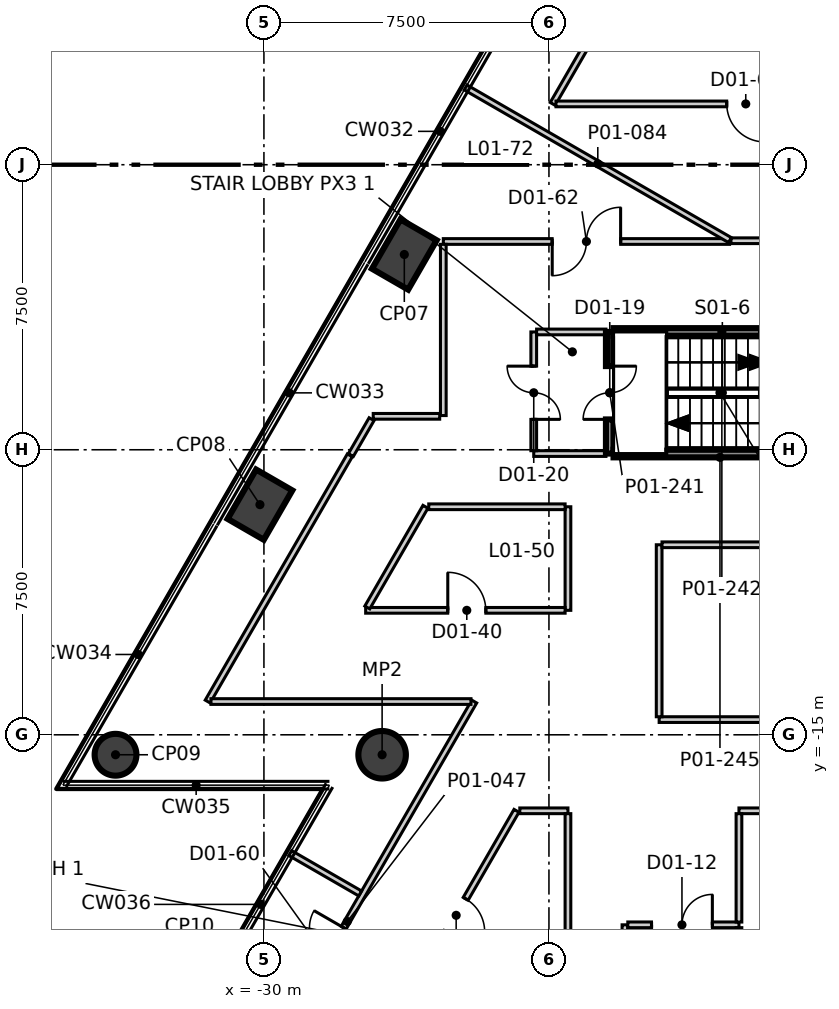
"""IFC4 building model, lengths in metres.
Left out: names, types, materials, properties, quantities, classifications, styles, units other than length and angle.
Written with IfcOpenShell. Run it as: python <this file> out.ifc"""

import sys

from ifc_helpers import new_model, si_unit, direction, frame, frame_2d, origin, origin_2d, place, context, subcontext, project, spatial, rectangle, circle, extrude, element, fill, save


model = new_model("IFC4")
c1 = context("Model", 3, precision=1e-05, world=origin(), true_north=direction((0.0, 1.0)))
c2 = subcontext(c1, "Body", "Model", "MODEL_VIEW")
j1 = project(units=[si_unit("LENGTHUNIT", "METRE"), si_unit("PLANEANGLEUNIT", "RADIAN")], contexts=[c1])
p1 = place(None, origin())
s1 = spatial("IfcSite", under=j1, at=p1, CompositionType="ELEMENT")
p2 = place(p1, origin())
s2 = spatial("IfcBuilding", under=s1, at=p2, CompositionType="ELEMENT")
p3 = place(p2, frame((0.0, 0.0, 8.5)))
s3 = spatial("IfcBuildingStorey", under=s2, at=p3, CompositionType="ELEMENT", Elevation=8.5)
for number, where, z_axis, x_axis in (
    (1, (-26.306, -2.362, -0.4), (0.0, 0.0, 1.0), (0.5, 0.866, 0.0)),
    (2, (-30.105, -8.944, -0.4), (0.0, 0.0, 1.0), (0.5, 0.866, 0.0)),
):
    element("IfcColumn", number, at=place(p3, frame(where, z_axis=z_axis, x_axis=x_axis)), inside=s3, PredefinedType="COLUMN", context=c2, shape_type="SweptSolid", body=[
        extrude(rectangle(XDim=1.5, YDim=1.1, at=origin_2d()), origin(), (0.0, 0.0, 1.0), 6.0),
    ])
p4 = place(p3, frame((-33.905, -15.525, -0.4), z_axis=(0.0, 0.0, 1.0), x_axis=(0.5, 0.866025403784, 0.0)))
e3 = element("IfcColumn", 3, at=p4, inside=s3, PredefinedType="COLUMN", context=c2, shape_type="SweptSolid", body=[
    extrude(circle(Radius=0.55, at=origin_2d()), origin(), (0.0, 0.0, 1.0), 6.0),
])
p5 = place(p3, frame((-26.89, -15.525, -0.4), z_axis=(0.0, 0.0, 1.0), x_axis=(1.0, 0.0, 0.0)))
e4 = element("IfcColumn", 4, at=p5, inside=s3, PredefinedType="COLUMN", context=c2, shape_type="SweptSolid", body=[
    extrude(circle(Radius=0.625, at=origin_2d()), origin(), (0.0, 0.0, 1.0), 6.0),
])
p6 = place(p3, frame((-22.9, -7.6, 0.0), z_axis=(0.0, 0.0, 1.0), x_axis=(1.0, 0.0, 0.0)))
e5 = element("IfcWall", 5, at=p6, inside=s3, PredefinedType="PARTITIONING", context=c2, shape_type="SweptSolid", body=[
    extrude(rectangle(XDim=1.9, YDim=0.15, at=frame_2d((0.95, 0.0))), origin(), (0.0, 0.0, 1.0), 5.6),
])
p7 = place(p3, frame((-22.9, -7.525, 0.0), z_axis=(0.0, 0.0, 1.0), x_axis=(0.0, 1.0, 0.0)))
e6 = element("IfcWall", 6, at=p7, inside=s3, PredefinedType="PARTITIONING", context=c2, shape_type="SweptSolid", body=[
    extrude(rectangle(XDim=3.125, YDim=0.15, at=frame_2d((1.562, 0.0))), origin(), (0.0, 0.0, 1.0), 5.6),
])
p8 = place(p7, frame((0.825, 0.0, 0.0)))
e7 = element("IfcOpeningElement", 7, at=p8, cuts=e6, PredefinedType="OPENING", context=c2, shape_type="SweptSolid", body=[
    extrude(rectangle(XDim=1.4, YDim=2.1, at=frame_2d((0.7, 1.05))), frame((0.0, 0.085, 0.0), z_axis=(0.0, -1.0, 0.0), x_axis=(1.0, 0.0, 0.0)), (0.0, 0.0, 1.0), 0.17),
])
p9 = place(p3, frame((-22.825, -4.4, 0.0), z_axis=(0.0, 0.0, 1.0), x_axis=(1.0, 0.0, 0.0)))
e8 = element("IfcWall", 8, at=p9, inside=s3, PredefinedType="PARTITIONING", context=c2, shape_type="SweptSolid", body=[
    extrude(rectangle(XDim=1.825, YDim=0.15, at=frame_2d((0.913, 0.0))), origin(), (0.0, 0.0, 1.0), 5.6),
])
p10 = place(p3, frame((-20.5, -25.0, 0.0), z_axis=(0.0, 0.0, 1.0), x_axis=(0.0, 1.0, 0.0)))
e9 = element("IfcWall", 9, at=p10, inside=s3, PredefinedType="PARTITIONING", context=c2, shape_type="SweptSolid", body=[
    extrude(rectangle(XDim=5.0, YDim=0.15, at=frame_2d((2.5, 0.0))), origin(), (0.0, 0.0, 1.0), 5.6),
])
p11 = place(p3, frame((-20.425, -20.0, 0.0), z_axis=(0.0, 0.0, 1.0), x_axis=(1.0, 0.0, 0.0)))
e10 = element("IfcWall", 10, at=p11, inside=s3, PredefinedType="PARTITIONING", context=c2, shape_type="SweptSolid", body=[
    extrude(rectangle(XDim=2.925, YDim=0.15, at=frame_2d((1.462, 0.0))), origin(), (0.0, 0.0, 1.0), 5.6),
])
p12 = place(p11, frame((0.625, 0.0, 0.0)))
e11 = element("IfcOpeningElement", 11, at=p12, cuts=e10, PredefinedType="OPENING", context=c2, shape_type="SweptSolid", body=[
    extrude(rectangle(XDim=1.6, YDim=2.1, at=frame_2d((0.8, 1.05))), frame((0.0, 0.085, 0.0), z_axis=(0.0, -1.0, 0.0), x_axis=(1.0, 0.0, 0.0)), (0.0, 0.0, 1.0), 0.17),
])
p13 = place(p3, frame((-17.5, -25.0, 0.0), z_axis=(0.0, 0.0, 1.0), x_axis=(0.0, 1.0, 0.0)))
e12 = element("IfcWall", 12, at=p13, inside=s3, PredefinedType="PARTITIONING", context=c2, shape_type="SweptSolid", body=[
    extrude(rectangle(XDim=4.925, YDim=0.15, at=frame_2d((2.462, 0.0))), origin(), (0.0, 0.0, 1.0), 5.6),
])
p14 = place(p3, frame((-31.148, -25.7, 0.0), z_axis=(0.0, 0.0, 1.0), x_axis=(0.499948573786, 0.866055092687, 0.0)))
e13 = element("IfcWall", 13, at=p14, inside=s3, PredefinedType="PARTITIONING", context=c2, shape_type="SweptSolid", body=[
    extrude(rectangle(XDim=13.365, YDim=0.15, at=frame_2d((6.683, 0.0))), origin(), (0.0, 0.0, 1.0), 5.6),
])
p15 = place(p14, frame((4.693, 0.0, 0.0)))
e14 = element("IfcOpeningElement", 14, at=p15, cuts=e13, PredefinedType="OPENING", context=c2, shape_type="SweptSolid", body=[
    extrude(rectangle(XDim=1.8, YDim=2.1, at=frame_2d((0.9, 1.05))), frame((0.0, 0.085, 0.0), z_axis=(0.0, -1.0, 0.0), x_axis=(1.0, 0.0, 0.0)), (0.0, 0.0, 1.0), 0.17),
])
p16 = place(p14, frame((0.895, 0.0, 0.0)))
e15 = element("IfcOpeningElement", 15, at=p16, cuts=e13, PredefinedType="OPENING", context=c2, shape_type="SweptSolid", body=[
    extrude(rectangle(XDim=1.8, YDim=2.1, at=frame_2d((0.9, 1.05))), frame((0.0, 0.085, 0.0), z_axis=(0.0, -1.0, 0.0), x_axis=(1.0, 0.0, 0.0)), (0.0, 0.0, 1.0), 0.17),
])
p17 = place(p3, frame((-29.308, -18.113, 0.0), z_axis=(0.0, 0.0, 1.0), x_axis=(0.866214269573, -0.499672732084, 0.0)))
e16 = element("IfcWall", 16, at=p17, inside=s3, PredefinedType="PARTITIONING", context=c2, shape_type="SweptSolid", body=[
    extrude(rectangle(XDim=2.125, YDim=0.15, at=frame_2d((1.063, 0.0))), origin(), (0.0, 0.0, 1.0), 5.6),
])
p18 = place(p3, frame((-25.28, -2.02, 0.0), z_axis=(0.0, 0.0, 1.0), x_axis=(1.0, 0.0, 0.0)))
e17 = element("IfcWall", 17, at=p18, inside=s3, PredefinedType="PARTITIONING", context=c2, shape_type="SweptSolid", body=[
    extrude(rectangle(XDim=7.533, YDim=0.15, at=frame_2d((3.767, 0.0))), origin(), (0.0, 0.0, 1.0), 5.0),
])
p19 = place(p18, frame((2.866, 0.0, 0.0)))
e18 = element("IfcOpeningElement", 18, at=p19, cuts=e17, PredefinedType="OPENING", context=c2, shape_type="SweptSolid", body=[
    extrude(rectangle(XDim=1.8, YDim=2.1, at=frame_2d((0.9, 1.05))), frame((0.0, 0.085, 0.0), z_axis=(0.0, -1.0, 0.0), x_axis=(1.0, 0.0, 0.0)), (0.0, 0.0, 1.0), 0.17),
])
p20 = place(p3, frame((-25.28, -6.6, 0.0), z_axis=(0.0, 0.0, 1.0), x_axis=(0.0, 1.0, 0.0)))
e19 = element("IfcWall", 19, at=p20, inside=s3, PredefinedType="PARTITIONING", context=c2, shape_type="SweptSolid", body=[
    extrude(rectangle(XDim=4.505, YDim=0.15, at=frame_2d((2.252, 0.0))), origin(), (0.0, 0.0, 1.0), 5.6),
])
p21 = place(p3, frame((-27.124, -6.62, 0.0), z_axis=(0.0, 0.0, 1.0), x_axis=(1.0, 0.0, 0.0)))
e20 = element("IfcWall", 20, at=p21, inside=s3, PredefinedType="PARTITIONING", context=c2, shape_type="SweptSolid", body=[
    extrude(rectangle(XDim=1.749, YDim=0.15, at=frame_2d((0.875, 0.0))), origin(), (0.0, 0.0, 1.0), 5.6),
])
p22 = place(p3, frame((-27.713, -7.64, 0.0), z_axis=(0.0, 0.0, 1.0), x_axis=(0.500277597875, 0.865865073245, 0.0)))
e21 = element("IfcWall", 21, at=p22, inside=s3, PredefinedType="PARTITIONING", context=c2, shape_type="SweptSolid", body=[
    extrude(rectangle(XDim=1.091, YDim=0.15, at=frame_2d((0.546, 0.0))), origin(), (0.0, 0.0, 1.0), 5.6),
])
p23 = place(p3, frame((-31.48, -14.125, 0.0), z_axis=(0.0, 0.0, 1.0), x_axis=(0.49998991361, 0.866031227086, 0.0)))
e22 = element("IfcWall", 22, at=p23, inside=s3, PredefinedType="PARTITIONING", context=c2, shape_type="SweptSolid", body=[
    extrude(rectangle(XDim=7.48, YDim=0.15, at=frame_2d((3.74, 0.0))), origin(), (0.0, 0.0, 1.0), 5.6),
])
p24 = place(p3, frame((-22.401, 1.6, 0.0), z_axis=(0.0, 0.0, 1.0), x_axis=(0.499995671072, 0.866027903078, 0.0)))
e23 = element("IfcWall", 23, at=p24, inside=s3, PredefinedType="PARTITIONING", context=c2, shape_type="SweptSolid", body=[
    extrude(rectangle(XDim=9.076, YDim=0.15, at=frame_2d((4.538, 0.0))), origin(), (0.0, 0.0, 1.0), 5.6),
])
p25 = place(p3, frame((-31.394, -14.125, 0.0), z_axis=(0.0, 0.0, 1.0), x_axis=(1.0, 0.0, 0.0)))
e24 = element("IfcWall", 24, at=p25, inside=s3, PredefinedType="PARTITIONING", context=c2, shape_type="SweptSolid", body=[
    extrude(rectangle(XDim=6.842, YDim=0.15, at=frame_2d((3.421, 0.0))), origin(), (0.0, 0.0, 1.0), 5.6),
])
p26 = place(p3, frame((-26.486, -22.425, 0.0), z_axis=(0.0, 0.0, 1.0), x_axis=(0.499991221239, 0.866030472145, 0.0)))
e25 = element("IfcWall", 25, at=p26, inside=s3, PredefinedType="PARTITIONING", context=c2, shape_type="SweptSolid", body=[
    extrude(rectangle(XDim=6.264, YDim=0.15, at=frame_2d((3.132, 0.0))), origin(), (0.0, 0.0, 1.0), 5.6),
])
p27 = place(p26, frame((2.589, 0.0, 0.0)))
e26 = element("IfcOpeningElement", 26, at=p27, cuts=e25, PredefinedType="OPENING", context=c2, shape_type="SweptSolid", body=[
    extrude(rectangle(XDim=1.0, YDim=2.1, at=frame_2d((0.5, 1.05))), frame((0.0, 0.085, 0.0), z_axis=(0.0, -1.0, 0.0), x_axis=(1.0, 0.0, 0.0)), (0.0, 0.0, 1.0), 0.17),
])
p28 = place(p3, frame((-23.267, -17.0, 0.0), z_axis=(0.0, 0.0, 1.0), x_axis=(1.0, 0.0, 0.0)))
e27 = element("IfcWall", 27, at=p28, inside=s3, PredefinedType="PARTITIONING", context=c2, shape_type="SweptSolid", body=[
    extrude(rectangle(XDim=1.267, YDim=0.15, at=frame_2d((0.634, 0.0))), origin(), (0.0, 0.0, 1.0), 5.6),
])
p29 = place(p3, frame((-17.5, -17.0, 0.0), z_axis=(0.0, 0.0, 1.0), x_axis=(1.0, 0.0, 0.0)))
e28 = element("IfcWall", 28, at=p29, inside=s3, PredefinedType="PARTITIONING", context=c2, shape_type="SweptSolid", body=[
    extrude(rectangle(XDim=4.5, YDim=0.15, at=frame_2d((2.25, 0.0))), origin(), (0.0, 0.0, 1.0), 5.6),
])
p30 = place(p3, frame((-22.0, -22.425, 0.0), z_axis=(0.0, 0.0, 1.0), x_axis=(0.0, 1.0, 0.0)))
e29 = element("IfcWall", 29, at=p30, inside=s3, PredefinedType="PARTITIONING", context=c2, shape_type="SweptSolid", body=[
    extrude(rectangle(XDim=5.35, YDim=0.15, at=frame_2d((2.675, 0.0))), origin(), (0.0, 0.0, 1.0), 5.6),
])
p31 = place(p3, frame((-22.0, -11.725, 0.0), z_axis=(0.0, 0.0, 1.0), x_axis=(0.0, 1.0, 0.0)))
e30 = element("IfcWall", 30, at=p31, inside=s3, PredefinedType="PARTITIONING", context=c2, shape_type="SweptSolid", body=[
    extrude(rectangle(XDim=2.725, YDim=0.15, at=frame_2d((1.363, 0.0))), origin(), (0.0, 0.0, 1.0), 5.6),
])
p32 = place(p3, frame((-24.692, 2.033, 0.0), z_axis=(0.0, 0.0, 1.0), x_axis=(0.865998774365, -0.50004612067, 0.0)))
e31 = element("IfcWall", 31, at=p32, inside=s3, PredefinedType="PARTITIONING", context=c2, shape_type="SweptSolid", body=[
    extrude(rectangle(XDim=8.031, YDim=0.15, at=frame_2d((4.016, 0.0))), origin(), (0.0, 0.0, 1.0), 5.6),
])
p33 = place(p3, frame((-22.315, 1.6, 0.0), z_axis=(0.0, 0.0, 1.0), x_axis=(1.0, 0.0, 0.0)))
e32 = element("IfcWall", 32, at=p33, inside=s3, PredefinedType="PARTITIONING", context=c2, shape_type="SweptSolid", body=[
    extrude(rectangle(XDim=10.075, YDim=0.15, at=frame_2d((5.038, 0.0))), origin(), (0.0, 0.0, 1.0), 5.6),
])
p34 = place(p33, frame((4.494, 0.0, 0.0)))
e33 = element("IfcOpeningElement", 33, at=p34, cuts=e32, PredefinedType="OPENING", context=c2, shape_type="SweptSolid", body=[
    extrude(rectangle(XDim=1.0, YDim=2.1, at=frame_2d((0.5, 1.05))), frame((0.0, 0.085, 0.0), z_axis=(0.0, -1.0, 0.0), x_axis=(1.0, 0.0, 0.0)), (0.0, 0.0, 1.0), 0.17),
])
p35 = place(p3, frame((-17.71, -2.0, 0.0), z_axis=(0.0, 0.0, 1.0), x_axis=(1.0, 0.0, 0.0)))
e34 = element("IfcWall", 34, at=p35, inside=s3, PredefinedType="PARTITIONING", context=c2, shape_type="SweptSolid", body=[
    extrude(rectangle(XDim=3.305, YDim=0.15, at=frame_2d((1.652, 0.0))), origin(), (0.0, 0.0, 1.0), 5.0),
])
p36 = place(p3, frame((-17.5, -19.927, 0.0), z_axis=(0.0, 0.0, 1.0), x_axis=(0.0, 1.0, 0.0)))
e35 = element("IfcWall", 35, at=p36, inside=s3, PredefinedType="PARTITIONING", context=c2, shape_type="SweptSolid", body=[
    extrude(rectangle(XDim=2.852, YDim=0.15, at=frame_2d((1.426, 0.0))), origin(), (0.0, 0.0, 1.0), 5.6),
])
p37 = place(p3, frame((-19.6, -14.6, 0.0), z_axis=(0.0, 0.0, 1.0), x_axis=(1.0, 0.0, 0.0)))
e36 = element("IfcWall", 36, at=p37, inside=s3, PredefinedType="PARTITIONING", context=c2, shape_type="SweptSolid", body=[
    extrude(rectangle(XDim=10.036, YDim=0.15, at=frame_2d((5.018, 0.0))), origin(), (0.0, 0.0, 1.0), 5.6),
])
p38 = place(p37, frame((4.156, 0.0, 0.0)))
e37 = element("IfcOpeningElement", 37, at=p38, cuts=e36, PredefinedType="OPENING", context=c2, shape_type="SweptSolid", body=[
    extrude(rectangle(XDim=1.8, YDim=2.1, at=frame_2d((0.9, 1.05))), frame((0.0, 0.085, 0.0), z_axis=(0.0, -1.0, 0.0), x_axis=(1.0, 0.0, 0.0)), (0.0, 0.0, 1.0), 0.17),
])
p39 = place(p3, frame((-19.6, -14.525, 0.0), z_axis=(0.0, 0.0, 1.0), x_axis=(0.0, 1.0, 0.0)))
e38 = element("IfcWall", 38, at=p39, inside=s3, PredefinedType="PARTITIONING", context=c2, shape_type="SweptSolid", body=[
    extrude(rectangle(XDim=4.525, YDim=0.15, at=frame_2d((2.262, 0.0))), origin(), (0.0, 0.0, 1.0), 5.6),
])
p40 = place(p3, frame((-19.525, -10.0, 0.0), z_axis=(0.0, 0.0, 1.0), x_axis=(1.0, 0.0, 0.0)))
e39 = element("IfcWall", 39, at=p40, inside=s3, PredefinedType="PARTITIONING", context=c2, shape_type="SweptSolid", body=[
    extrude(rectangle(XDim=4.976, YDim=0.15, at=frame_2d((2.488, 0.0))), origin(), (0.0, 0.0, 1.0), 5.6),
])
p41 = place(p3, frame((-27.323, -11.725, 0.0), z_axis=(0.0, 0.0, 1.0), x_axis=(1.0, 0.0, 0.0)))
e40 = element("IfcWall", 40, at=p41, inside=s3, PredefinedType="PARTITIONING", context=c2, shape_type="SweptSolid", body=[
    extrude(rectangle(XDim=5.248, YDim=0.15, at=frame_2d((2.624, 0.0))), origin(), (0.0, 0.0, 1.0), 5.6),
])
p42 = place(p41, frame((2.161, 0.0, 0.0)))
e41 = element("IfcOpeningElement", 41, at=p42, cuts=e40, PredefinedType="OPENING", context=c2, shape_type="SweptSolid", body=[
    extrude(rectangle(XDim=1.0, YDim=2.1, at=frame_2d((0.5, 1.05))), frame((0.0, 0.085, 0.0), z_axis=(0.0, -1.0, 0.0), x_axis=(1.0, 0.0, 0.0)), (0.0, 0.0, 1.0), 0.17),
])
p43 = place(p3, frame((-27.28, -11.65, 0.0), z_axis=(0.0, 0.0, 1.0), x_axis=(0.500026340207, 0.866010195725, 0.0)))
e42 = element("IfcWall", 42, at=p43, inside=s3, PredefinedType="PARTITIONING", context=c2, shape_type="SweptSolid", body=[
    extrude(rectangle(XDim=3.06, YDim=0.15, at=frame_2d((1.53, 0.0))), origin(), (0.0, 0.0, 1.0), 5.6),
])
p44 = place(p3, frame((-25.663, -9.0, 0.0), z_axis=(0.0, 0.0, 1.0), x_axis=(1.0, 0.0, 0.0)))
e43 = element("IfcWall", 43, at=p44, inside=s3, PredefinedType="PARTITIONING", context=c2, shape_type="SweptSolid", body=[
    extrude(rectangle(XDim=3.588, YDim=0.15, at=frame_2d((1.794, 0.0))), origin(), (0.0, 0.0, 1.0), 5.6),
])
p45 = place(p3, frame((-20.9, -7.6, 0.0), z_axis=(0.0, 0.0, 1.0), x_axis=(0.0, 1.0, 0.0)))
e44 = element("IfcWall", 44, at=p45, inside=s3, PredefinedType="SOLIDWALL", context=c2, shape_type="SweptSolid", body=[
    extrude(rectangle(XDim=3.2, YDim=0.2, at=frame_2d((1.6, 0.0))), origin(), (0.0, 0.0, 1.0), 5.6),
])
p46 = place(p45, frame((0.9, 0.0, 0.0)))
e45 = element("IfcOpeningElement", 45, at=p46, cuts=e44, PredefinedType="OPENING", context=c2, shape_type="SweptSolid", body=[
    extrude(rectangle(XDim=1.4, YDim=2.1, at=frame_2d((0.7, 1.05))), frame((0.0, 0.11, 0.0), z_axis=(0.0, -1.0, 0.0), x_axis=(1.0, 0.0, 0.0)), (0.0, 0.0, 1.0), 0.22),
])
p47 = place(p3, frame((-20.8, -4.4, 0.0), z_axis=(0.0, 0.0, 1.0), x_axis=(1.0, 0.0, 0.0)))
e46 = element("IfcWall", 46, at=p47, inside=s3, PredefinedType="SOLIDWALL", context=c2, shape_type="SweptSolid", body=[
    extrude(rectangle(XDim=5.7, YDim=0.2, at=frame_2d((2.85, 0.0))), origin(), (0.0, 0.0, 1.0), 5.6),
])
p48 = place(p3, frame((-20.8, -7.6, 0.0), z_axis=(0.0, 0.0, 1.0), x_axis=(1.0, 0.0, 0.0)))
e47 = element("IfcWall", 47, at=p48, inside=s3, PredefinedType="SOLIDWALL", context=c2, shape_type="SweptSolid", body=[
    extrude(rectangle(XDim=5.6, YDim=0.2, at=frame_2d((2.8, 0.0))), origin(), (0.0, 0.0, 1.0), 5.6),
])
p49 = place(p12, origin())
e48 = element("IfcDoor", 48, at=p49, inside=s3, OperationType="DOUBLE_DOOR_SINGLE_SWING", PredefinedType="DOOR", context=c2, shape_type="SweptSolid", body=[
    extrude(rectangle(XDim=1.6, YDim=2.1, at=frame_2d((0.8, 1.05))), frame((0.0, 0.025, 0.0), z_axis=(0.0, -1.0, 0.0), x_axis=(1.0, 0.0, 0.0)), (0.0, 0.0, 1.0), 0.05),
])
fill(e11, e48)
p50 = place(p46, origin())
e49 = element("IfcDoor", 49, at=p50, inside=s3, OperationType="DOUBLE_DOOR_SINGLE_SWING", PredefinedType="DOOR", context=c2, shape_type="SweptSolid", body=[
    extrude(rectangle(XDim=1.4, YDim=2.1, at=frame_2d((0.7, 1.05))), frame((0.0, 0.025, 0.0), z_axis=(0.0, -1.0, 0.0), x_axis=(1.0, 0.0, 0.0)), (0.0, 0.0, 1.0), 0.05),
])
fill(e45, e49)
p51 = place(p8, origin())
e50 = element("IfcDoor", 50, at=p51, inside=s3, OperationType="DOUBLE_DOOR_SINGLE_SWING", PredefinedType="DOOR", context=c2, shape_type="SweptSolid", body=[
    extrude(rectangle(XDim=1.4, YDim=2.1, at=frame_2d((0.7, 1.05))), frame((0.0, 0.025, 0.0), z_axis=(0.0, -1.0, 0.0), x_axis=(1.0, 0.0, 0.0)), (0.0, 0.0, 1.0), 0.05),
])
fill(e7, e50)
p52 = place(p27, origin())
e51 = element("IfcDoor", 51, at=p52, inside=s3, OperationType="SINGLE_SWING_LEFT", PredefinedType="DOOR", context=c2, shape_type="SweptSolid", body=[
    extrude(rectangle(XDim=1.0, YDim=2.1, at=frame_2d((0.5, 1.05))), frame((0.0, 0.025, 0.0), z_axis=(0.0, -1.0, 0.0), x_axis=(1.0, 0.0, 0.0)), (0.0, 0.0, 1.0), 0.05),
])
fill(e26, e51)
p53 = place(p42, origin())
e52 = element("IfcDoor", 52, at=p53, inside=s3, OperationType="SINGLE_SWING_RIGHT", PredefinedType="DOOR", context=c2, shape_type="SweptSolid", body=[
    extrude(rectangle(XDim=1.0, YDim=2.1, at=frame_2d((0.5, 1.05))), frame((0.0, 0.025, 0.0), z_axis=(0.0, -1.0, 0.0), x_axis=(1.0, 0.0, 0.0)), (0.0, 0.0, 1.0), 0.05),
])
fill(e41, e52)
p54 = place(p15, origin())
e53 = element("IfcDoor", 53, at=p54, inside=s3, OperationType="DOUBLE_DOOR_SINGLE_SWING", PredefinedType="DOOR", context=c2, shape_type="SweptSolid", body=[
    extrude(rectangle(XDim=1.8, YDim=2.1, at=frame_2d((0.9, 1.05))), frame((0.0, 0.025, 0.0), z_axis=(0.0, -1.0, 0.0), x_axis=(1.0, 0.0, 0.0)), (0.0, 0.0, 1.0), 0.05),
])
fill(e14, e53)
p55 = place(p19, origin())
e54 = element("IfcDoor", 54, at=p55, inside=s3, OperationType="DOUBLE_DOOR_SINGLE_SWING", PredefinedType="DOOR", context=c2, shape_type="SweptSolid", body=[
    extrude(rectangle(XDim=1.8, YDim=2.1, at=frame_2d((0.9, 1.05))), frame((0.0, 0.025, 0.0), z_axis=(0.0, -1.0, 0.0), x_axis=(1.0, 0.0, 0.0)), (0.0, 0.0, 1.0), 0.05),
])
fill(e18, e54)
p56 = place(p34, origin())
e55 = element("IfcDoor", 55, at=p56, inside=s3, OperationType="SINGLE_SWING_RIGHT", PredefinedType="DOOR", context=c2, shape_type="SweptSolid", body=[
    extrude(rectangle(XDim=1.0, YDim=2.1, at=frame_2d((0.5, 1.05))), frame((0.0, 0.025, 0.0), z_axis=(0.0, -1.0, 0.0), x_axis=(1.0, 0.0, 0.0)), (0.0, 0.0, 1.0), 0.05),
])
fill(e33, e55)
save(model, sys.argv[1])
